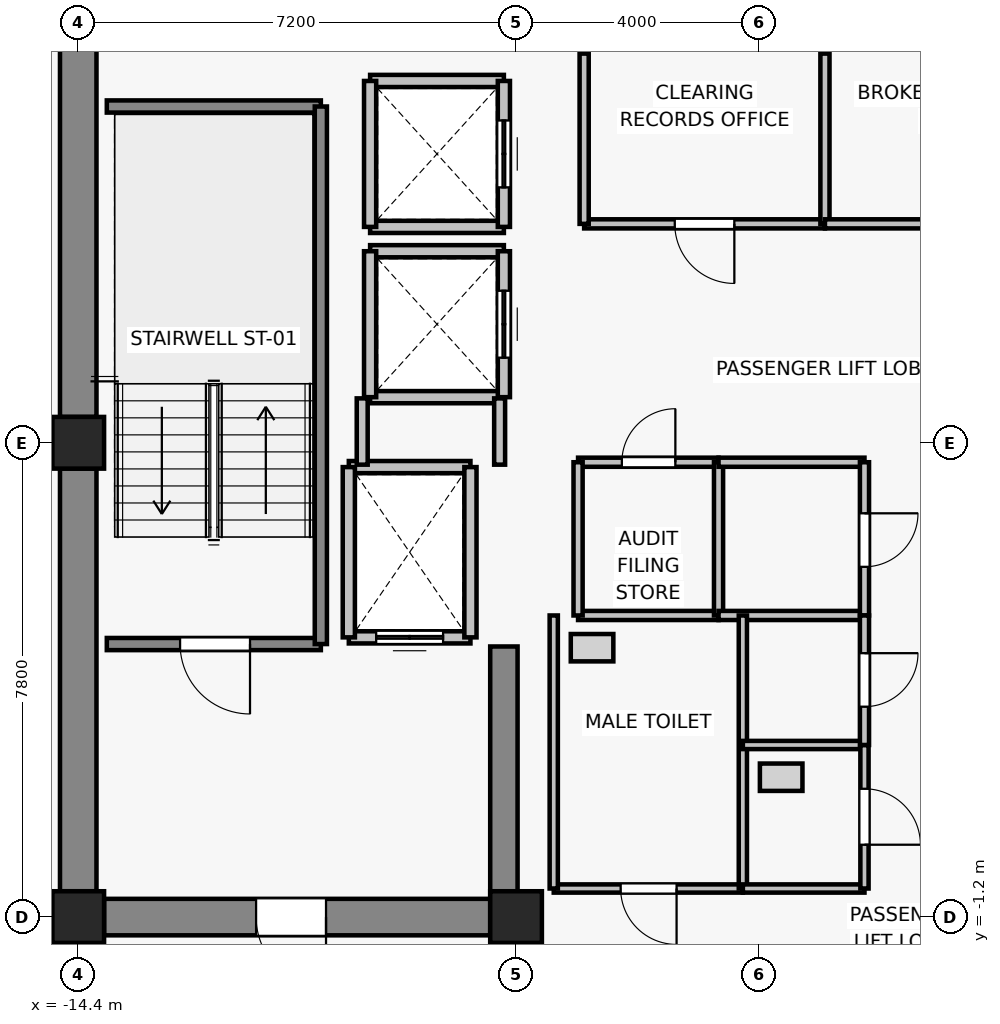
"""IFC4 building model, lengths in metres.
Left out: names, types, materials, properties, quantities, classifications, styles, units other than length and angle.
Written with IfcOpenShell. Run it as: python <this file> out.ifc"""

import sys

from ifc_helpers import new_model, si_unit, direction, frame, frame_2d, origin, origin_2d, place, context, subcontext, project, spatial, rectangle, extrude, source, transform, mapped, element, fill, save


model = new_model("IFC4")
c1 = context("Model", 3, precision=1e-05, world=origin(), true_north=direction((0.0, 1.0)))
c2 = subcontext(c1, "Body", "Model", "MODEL_VIEW")
j1 = project(units=[si_unit("LENGTHUNIT", "METRE"), si_unit("PLANEANGLEUNIT", "RADIAN")], contexts=[c1])
p1 = place(None, origin())
s1 = spatial("IfcSite", under=j1, at=p1, CompositionType="ELEMENT")
p2 = place(p1, origin())
s2 = spatial("IfcBuilding", under=s1, at=p2, CompositionType="ELEMENT")
p3 = place(p2, frame((0.0, 0.0, 225.4)))
s3 = spatial("IfcBuildingStorey", under=s2, at=p3, CompositionType="ELEMENT", Elevation=225.4)
for number, where, z_axis, x_axis in (
    (1, (-14.4, -1.2, 0.0), (0.0, 0.0, 1.0), (1.0, 0.0, 0.0)),
    (2, (-7.2, -1.2, 0.0), (0.0, 0.0, 1.0), (1.0, 0.0, 0.0)),
    (3, (-14.4, 6.6, 0.0), (0.0, 0.0, 1.0), (1.0, 0.0, 0.0)),
):
    element("IfcColumn", number, at=place(p3, frame(where, z_axis=z_axis, x_axis=x_axis)), inside=s3, PredefinedType="COLUMN", context=c2, shape_type="SweptSolid", body=[
        extrude(rectangle(XDim=0.85, YDim=0.85, at=origin_2d()), origin(), (0.0, 0.0, 1.0), 3.3),
    ])
p4 = place(p3, frame((-14.4, -0.775, 0.0), z_axis=(0.0, 0.0, 1.0), x_axis=(0.0, 1.0, 0.0)))
e4 = element("IfcWall", 4, at=p4, inside=s3, PredefinedType="SHEAR", context=c2, shape_type="SweptSolid", body=[
    extrude(rectangle(XDim=6.95, YDim=0.6, at=frame_2d((3.475, 0.0))), origin(), (0.0, 0.0, 1.0), 3.075),
])
p5 = place(p3, frame((-14.4, 7.025, 0.0), z_axis=(0.0, 0.0, 1.0), x_axis=(0.0, 1.0, 0.0)))
e5 = element("IfcWall", 5, at=p5, inside=s3, PredefinedType="SHEAR", context=c2, shape_type="SweptSolid", body=[
    extrude(rectangle(XDim=6.05, YDim=0.6, at=frame_2d((3.025, 0.0))), origin(), (0.0, 0.0, 1.0), 3.075),
])
p6 = place(p3, frame((-7.625, -1.2, 0.0), z_axis=(0.0, 0.0, 1.0), x_axis=(-1.0, 0.0, 0.0)))
e6 = element("IfcWall", 6, at=p6, inside=s3, PredefinedType="SHEAR", context=c2, shape_type="SweptSolid", body=[
    extrude(rectangle(XDim=6.35, YDim=0.6, at=frame_2d((3.175, 0.0))), origin(), (0.0, 0.0, 1.0), 3.075),
])
p7 = place(p6, frame((2.7, 0.0, 0.0)))
e7 = element("IfcOpeningElement", 7, at=p7, cuts=e6, PredefinedType="OPENING", context=c2, shape_type="SweptSolid", body=[
    extrude(rectangle(XDim=1.15, YDim=2.15, at=frame_2d((0.575, 1.075))), frame((0.0, 0.31, 0.0), z_axis=(0.0, -1.0, 0.0), x_axis=(1.0, 0.0, 0.0)), (0.0, 0.0, 1.0), 0.62),
])
p8 = place(p3, frame((-7.4, -0.9, 0.0), z_axis=(0.0, 0.0, 1.0), x_axis=(0.0, 1.0, 0.0)))
e8 = element("IfcWall", 8, at=p8, inside=s3, PredefinedType="SHEAR", context=c2, shape_type="SweptSolid", body=[
    extrude(rectangle(XDim=4.15, YDim=0.45, at=frame_2d((2.075, 0.0))), origin(), (0.0, 0.0, 1.0), 3.075),
])
p9 = place(p3, frame((-7.95, 3.4, 0.0), z_axis=(0.0, 0.0, 1.0), x_axis=(-1.0, 0.0, 0.0)))
e9 = element("IfcWall", 9, at=p9, inside=s3, PredefinedType="SOLIDWALL", context=c2, shape_type="SweptSolid", body=[
    extrude(rectangle(XDim=2.0, YDim=0.2, at=frame_2d((1.0, 0.0))), origin(), (0.0, 0.0, 1.0), 3.075),
])
p10 = place(p9, frame((0.45, 0.0, 0.0)))
e10 = element("IfcOpeningElement", 10, at=p10, cuts=e9, PredefinedType="OPENING", context=c2, shape_type="SweptSolid", body=[
    extrude(rectangle(XDim=1.1, YDim=2.2, at=frame_2d((0.55, 1.1))), frame((0.0, 0.11, 0.0), z_axis=(0.0, -1.0, 0.0), x_axis=(1.0, 0.0, 0.0)), (0.0, 0.0, 1.0), 0.22),
])
p11 = place(p3, frame((-9.95, 6.2, 0.0), z_axis=(0.0, 0.0, 1.0), x_axis=(1.0, 0.0, 0.0)))
e11 = element("IfcWall", 11, at=p11, inside=s3, PredefinedType="SOLIDWALL", context=c2, shape_type="SweptSolid", body=[
    extrude(rectangle(XDim=2.0, YDim=0.2, at=frame_2d((1.0, 0.0))), origin(), (0.0, 0.0, 1.0), 3.075),
])
for number, where, z_axis, x_axis in (
    (12, (-9.95, 3.4, 0.0), (0.0, 0.0, 1.0), (0.0, 1.0, 0.0)),
    (13, (-7.95, 6.2, 0.0), (0.0, 0.0, 1.0), (0.0, -1.0, 0.0)),
):
    element("IfcWall", number, at=place(p3, frame(where, z_axis=z_axis, x_axis=x_axis)), inside=s3, PredefinedType="SOLIDWALL", context=c2, shape_type="SweptSolid", body=[
        extrude(rectangle(XDim=2.8, YDim=0.2, at=frame_2d((1.4, 0.0))), origin(), (0.0, 0.0, 1.0), 3.075),
    ])
for number, where, z_axis, x_axis in (
    (14, (-7.4, 7.35, 0.0), (0.0, 0.0, 1.0), (-1.0, 0.0, 0.0)),
    (15, (-9.6, 9.75, 0.0), (0.0, 0.0, 1.0), (1.0, 0.0, 0.0)),
):
    element("IfcWall", number, at=place(p3, frame(where, z_axis=z_axis, x_axis=x_axis)), inside=s3, PredefinedType="SOLIDWALL", context=c2, shape_type="SweptSolid", body=[
        extrude(rectangle(XDim=2.2, YDim=0.2, at=frame_2d((1.1, 0.0))), origin(), (0.0, 0.0, 1.0), 2.615),
    ])
p12 = place(p3, frame((-9.6, 7.35, 0.0), z_axis=(0.0, 0.0, 1.0), x_axis=(0.0, 1.0, 0.0)))
e16 = element("IfcWall", 16, at=p12, inside=s3, PredefinedType="SOLIDWALL", context=c2, shape_type="SweptSolid", body=[
    extrude(rectangle(XDim=2.4, YDim=0.2, at=frame_2d((1.2, 0.0))), origin(), (0.0, 0.0, 1.0), 3.075),
])
p13 = place(p3, frame((-7.4, 9.75, 0.0), z_axis=(0.0, 0.0, 1.0), x_axis=(0.0, -1.0, 0.0)))
e17 = element("IfcWall", 17, at=p13, inside=s3, PredefinedType="SOLIDWALL", context=c2, shape_type="SweptSolid", body=[
    extrude(rectangle(XDim=2.4, YDim=0.2, at=frame_2d((1.2, 0.0))), origin(), (0.0, 0.0, 1.0), 2.615),
])
p14 = place(p13, frame((0.65, 0.0, 0.0)))
e18 = element("IfcOpeningElement", 18, at=p14, cuts=e17, PredefinedType="OPENING", context=c2, shape_type="SweptSolid", body=[
    extrude(rectangle(XDim=1.1, YDim=2.2, at=frame_2d((0.55, 1.1))), frame((0.0, 0.11, 0.0), z_axis=(0.0, -1.0, 0.0), x_axis=(1.0, 0.0, 0.0)), (0.0, 0.0, 1.0), 0.22),
])
for number, where, z_axis, x_axis in (
    (19, (-7.4, 10.15, 0.0), (0.0, 0.0, 1.0), (-1.0, 0.0, 0.0)),
    (20, (-9.6, 12.55, 0.0), (0.0, 0.0, 1.0), (1.0, 0.0, 0.0)),
):
    element("IfcWall", number, at=place(p3, frame(where, z_axis=z_axis, x_axis=x_axis)), inside=s3, PredefinedType="SOLIDWALL", context=c2, shape_type="SweptSolid", body=[
        extrude(rectangle(XDim=2.2, YDim=0.2, at=frame_2d((1.1, 0.0))), origin(), (0.0, 0.0, 1.0), 2.615),
    ])
p15 = place(p3, frame((-9.6, 10.15, 0.0), z_axis=(0.0, 0.0, 1.0), x_axis=(0.0, 1.0, 0.0)))
e21 = element("IfcWall", 21, at=p15, inside=s3, PredefinedType="SOLIDWALL", context=c2, shape_type="SweptSolid", body=[
    extrude(rectangle(XDim=2.4, YDim=0.2, at=frame_2d((1.2, 0.0))), origin(), (0.0, 0.0, 1.0), 3.075),
])
p16 = place(p3, frame((-7.4, 12.55, 0.0), z_axis=(0.0, 0.0, 1.0), x_axis=(0.0, -1.0, 0.0)))
e22 = element("IfcWall", 22, at=p16, inside=s3, PredefinedType="SOLIDWALL", context=c2, shape_type="SweptSolid", body=[
    extrude(rectangle(XDim=2.4, YDim=0.2, at=frame_2d((1.2, 0.0))), origin(), (0.0, 0.0, 1.0), 2.615),
])
p17 = place(p16, frame((0.65, 0.0, 0.0)))
e23 = element("IfcOpeningElement", 23, at=p17, cuts=e22, PredefinedType="OPENING", context=c2, shape_type="SweptSolid", body=[
    extrude(rectangle(XDim=1.1, YDim=2.2, at=frame_2d((0.55, 1.1))), frame((0.0, 0.11, 0.0), z_axis=(0.0, -1.0, 0.0), x_axis=(1.0, 0.0, 0.0)), (0.0, 0.0, 1.0), 0.22),
])
p18 = place(p3, frame((-10.41, 3.29, 0.0), z_axis=(0.0, 0.0, 1.0), x_axis=(-1.0, 0.0, 0.0)))
e24 = element("IfcWall", 24, at=p18, inside=s3, PredefinedType="SOLIDWALL", context=c2, shape_type="SweptSolid", body=[
    extrude(rectangle(XDim=3.52, YDim=0.2, at=frame_2d((1.76, 0.0))), origin(), (0.0, 0.0, 1.0), 3.075),
])
p19 = place(p18, frame((1.165, 0.0, 0.0)))
e25 = element("IfcOpeningElement", 25, at=p19, cuts=e24, PredefinedType="OPENING", context=c2, shape_type="SweptSolid", body=[
    extrude(rectangle(XDim=1.15, YDim=2.15, at=frame_2d((0.575, 1.075))), frame((0.0, 0.11, 0.0), z_axis=(0.0, -1.0, 0.0), x_axis=(1.0, 0.0, 0.0)), (0.0, 0.0, 1.0), 0.22),
])
p20 = place(p3, frame((-13.93, 12.13, 0.0), z_axis=(0.0, 0.0, 1.0), x_axis=(1.0, 0.0, 0.0)))
e26 = element("IfcWall", 26, at=p20, inside=s3, PredefinedType="SOLIDWALL", context=c2, shape_type="SweptSolid", body=[
    extrude(rectangle(XDim=3.52, YDim=0.2, at=frame_2d((1.76, 0.0))), origin(), (0.0, 0.0, 1.0), 3.075),
])
p21 = place(p3, frame((-10.41, 12.13, 0.0), z_axis=(0.0, 0.0, 1.0), x_axis=(0.0, -1.0, 0.0)))
e27 = element("IfcWall", 27, at=p21, inside=s3, PredefinedType="SOLIDWALL", context=c2, shape_type="SweptSolid", body=[
    extrude(rectangle(XDim=8.84, YDim=0.2, at=frame_2d((4.42, 0.0))), origin(), (0.0, 0.0, 1.0), 3.075),
])
p22 = place(p3, frame((-9.73, 6.24, 0.0), z_axis=(0.0, 0.0, 1.0), x_axis=(0.0, 1.0, 0.0)))
e28 = element("IfcWall", 28, at=p22, inside=s3, PredefinedType="PARTITIONING", context=c2, shape_type="SweptSolid", body=[
    extrude(rectangle(XDim=1.09, YDim=0.18, at=frame_2d((0.545, 0.0))), origin(), (0.0, 0.0, 1.0), 3.075),
])
p23 = place(p3, frame((-7.47, 7.33, 0.0), z_axis=(0.0, 0.0, 1.0), x_axis=(0.0, -1.0, 0.0)))
e29 = element("IfcWall", 29, at=p23, inside=s3, PredefinedType="PARTITIONING", context=c2, shape_type="SweptSolid", body=[
    extrude(rectangle(XDim=1.09, YDim=0.18, at=frame_2d((0.545, 0.0))), origin(), (0.0, 0.0, 1.0), 2.615),
])
p24 = place(p3, frame((-2.12, 10.2, 0.0), z_axis=(0.0, 0.0, 1.0), x_axis=(-1.0, 0.0, 0.0)))
e30 = element("IfcWall", 30, at=p24, inside=s3, PredefinedType="PARTITIONING", context=c2, shape_type="SweptSolid", body=[
    extrude(rectangle(XDim=3.96, YDim=0.15, at=frame_2d((1.98, 0.0))), origin(), (0.0, 0.0, 1.0), 3.075),
])
p25 = place(p24, frame((1.49, 0.0, 0.0)))
e31 = element("IfcOpeningElement", 31, at=p25, cuts=e30, PredefinedType="OPENING", context=c2, shape_type="SweptSolid", body=[
    extrude(rectangle(XDim=0.98, YDim=2.15, at=frame_2d((0.49, 1.075))), frame((0.0, 0.085, 0.0), z_axis=(0.0, -1.0, 0.0), x_axis=(1.0, 0.0, 0.0)), (0.0, 0.0, 1.0), 0.17),
])
for number, where, z_axis, x_axis in (
    (32, (-6.08, 10.2, 0.0), (0.0, 0.0, 1.0), (0.0, 1.0, 0.0)),
    (33, (-2.12, 13.0, 0.0), (0.0, 0.0, 1.0), (0.0, -1.0, 0.0)),
):
    element("IfcWall", number, at=place(p3, frame(where, z_axis=z_axis, x_axis=x_axis)), inside=s3, PredefinedType="PARTITIONING", context=c2, shape_type="SweptSolid", body=[
        extrude(rectangle(XDim=2.8, YDim=0.15, at=frame_2d((1.4, 0.0))), origin(), (0.0, 0.0, 1.0), 3.075),
    ])
p26 = place(p3, frame((2.04, 10.2, 0.0), z_axis=(0.0, 0.0, 1.0), x_axis=(-1.0, 0.0, 0.0)))
e34 = element("IfcWall", 34, at=p26, inside=s3, PredefinedType="PARTITIONING", context=c2, shape_type="SweptSolid", body=[
    extrude(rectangle(XDim=4.16, YDim=0.15, at=frame_2d((2.08, 0.0))), origin(), (0.0, 0.0, 1.0), 3.075),
])
p27 = place(p26, frame((1.55, 0.0, 0.0)))
e35 = element("IfcOpeningElement", 35, at=p27, cuts=e34, PredefinedType="OPENING", context=c2, shape_type="SweptSolid", body=[
    extrude(rectangle(XDim=0.98, YDim=2.15, at=frame_2d((0.49, 1.075))), frame((0.0, 0.085, 0.0), z_axis=(0.0, -1.0, 0.0), x_axis=(1.0, 0.0, 0.0)), (0.0, 0.0, 1.0), 0.17),
])
p28 = place(p3, frame((-3.87, 3.76, 0.0), z_axis=(0.0, 0.0, 1.0), x_axis=(-1.0, 0.0, 0.0)))
e36 = element("IfcWall", 36, at=p28, inside=s3, PredefinedType="PARTITIONING", context=c2, shape_type="SweptSolid", body=[
    extrude(rectangle(XDim=2.31, YDim=0.15, at=frame_2d((1.155, 0.0))), origin(), (0.0, 0.0, 1.0), 3.075),
])
p29 = place(p3, frame((-6.18, 6.28, 0.0), z_axis=(0.0, 0.0, 1.0), x_axis=(1.0, 0.0, 0.0)))
e37 = element("IfcWall", 37, at=p29, inside=s3, PredefinedType="PARTITIONING", context=c2, shape_type="SweptSolid", body=[
    extrude(rectangle(XDim=2.31, YDim=0.15, at=frame_2d((1.155, 0.0))), origin(), (0.0, 0.0, 1.0), 3.075),
])
p30 = place(p29, frame((0.72, 0.0, 0.0)))
e38 = element("IfcOpeningElement", 38, at=p30, cuts=e37, PredefinedType="OPENING", context=c2, shape_type="SweptSolid", body=[
    extrude(rectangle(XDim=0.88, YDim=2.1, at=frame_2d((0.44, 1.05))), frame((0.0, 0.085, 0.0), z_axis=(0.0, -1.0, 0.0), x_axis=(1.0, 0.0, 0.0)), (0.0, 0.0, 1.0), 0.17),
])
for number, where, z_axis, x_axis in (
    (39, (-6.18, 3.76, 0.0), (0.0, 0.0, 1.0), (0.0, 1.0, 0.0)),
    (40, (-3.87, 6.28, 0.0), (0.0, 0.0, 1.0), (0.0, -1.0, 0.0)),
):
    element("IfcWall", number, at=place(p3, frame(where, z_axis=z_axis, x_axis=x_axis)), inside=s3, PredefinedType="PARTITIONING", context=c2, shape_type="SweptSolid", body=[
        extrude(rectangle(XDim=2.52, YDim=0.15, at=frame_2d((1.26, 0.0))), origin(), (0.0, 0.0, 1.0), 3.075),
    ])
for number, where, z_axis, x_axis in (
    (41, (-1.47, 3.76, 0.0), (0.0, 0.0, 1.0), (-1.0, 0.0, 0.0)),
    (42, (-3.87, 6.28, 0.0), (0.0, 0.0, 1.0), (1.0, 0.0, 0.0)),
):
    element("IfcWall", number, at=place(p3, frame(where, z_axis=z_axis, x_axis=x_axis)), inside=s3, PredefinedType="PARTITIONING", context=c2, shape_type="SweptSolid", body=[
        extrude(rectangle(XDim=2.4, YDim=0.15, at=frame_2d((1.2, 0.0))), origin(), (0.0, 0.0, 1.0), 3.075),
    ])
p31 = place(p3, frame((-1.47, 6.28, 0.0), z_axis=(0.0, 0.0, 1.0), x_axis=(0.0, -1.0, 0.0)))
e43 = element("IfcWall", 43, at=p31, inside=s3, PredefinedType="PARTITIONING", context=c2, shape_type="SweptSolid", body=[
    extrude(rectangle(XDim=2.52, YDim=0.15, at=frame_2d((1.26, 0.0))), origin(), (0.0, 0.0, 1.0), 3.075),
])
p32 = place(p31, frame((0.84, 0.0, 0.0)))
e44 = element("IfcOpeningElement", 44, at=p32, cuts=e43, PredefinedType="OPENING", context=c2, shape_type="SweptSolid", body=[
    extrude(rectangle(XDim=0.88, YDim=2.1, at=frame_2d((0.44, 1.05))), frame((0.0, 0.085, 0.0), z_axis=(0.0, -1.0, 0.0), x_axis=(1.0, 0.0, 0.0)), (0.0, 0.0, 1.0), 0.17),
])
p33 = place(p3, frame((-3.47, -0.73, 0.0), z_axis=(0.0, 0.0, 1.0), x_axis=(-1.0, 0.0, 0.0)))
e45 = element("IfcWall", 45, at=p33, inside=s3, PredefinedType="PARTITIONING", context=c2, shape_type="SweptSolid", body=[
    extrude(rectangle(XDim=3.11, YDim=0.135, at=frame_2d((1.555, 0.0))), origin(), (0.0, 0.0, 1.0), 3.075),
])
p34 = place(p33, frame((1.09, 0.0, 0.0)))
e46 = element("IfcOpeningElement", 46, at=p34, cuts=e45, PredefinedType="OPENING", context=c2, shape_type="SweptSolid", body=[
    extrude(rectangle(XDim=0.92, YDim=2.1, at=frame_2d((0.46, 1.05))), frame((0.0, 0.077, 0.0), z_axis=(0.0, -1.0, 0.0), x_axis=(1.0, 0.0, 0.0)), (0.0, 0.0, 1.0), 0.155),
])
for number, where, z_axis, x_axis in (
    (47, (-6.58, -0.73, 0.0), (0.0, 0.0, 1.0), (0.0, 1.0, 0.0)),
    (48, (-3.47, 3.76, 0.0), (0.0, 0.0, 1.0), (0.0, -1.0, 0.0)),
):
    element("IfcWall", number, at=place(p3, frame(where, z_axis=z_axis, x_axis=x_axis)), inside=s3, PredefinedType="PARTITIONING", context=c2, shape_type="SweptSolid", body=[
        extrude(rectangle(XDim=4.49, YDim=0.135, at=frame_2d((2.245, 0.0))), origin(), (0.0, 0.0, 1.0), 3.075),
    ])
for number, where, z_axis, x_axis in (
    (49, (-1.47, -0.73, 0.0), (0.0, 0.0, 1.0), (-1.0, 0.0, 0.0)),
    (50, (-3.47, 1.63, 0.0), (0.0, 0.0, 1.0), (1.0, 0.0, 0.0)),
):
    element("IfcWall", number, at=place(p3, frame(where, z_axis=z_axis, x_axis=x_axis)), inside=s3, PredefinedType="PARTITIONING", context=c2, shape_type="SweptSolid", body=[
        extrude(rectangle(XDim=2.0, YDim=0.135, at=frame_2d((1.0, 0.0))), origin(), (0.0, 0.0, 1.0), 3.075),
    ])
p35 = place(p3, frame((-1.47, 1.63, 0.0), z_axis=(0.0, 0.0, 1.0), x_axis=(0.0, -1.0, 0.0)))
e51 = element("IfcWall", 51, at=p35, inside=s3, PredefinedType="PARTITIONING", context=c2, shape_type="SweptSolid", body=[
    extrude(rectangle(XDim=2.36, YDim=0.135, at=frame_2d((1.18, 0.0))), origin(), (0.0, 0.0, 1.0), 3.075),
])
p36 = place(p35, frame((0.72, 0.0, 0.0)))
e52 = element("IfcOpeningElement", 52, at=p36, cuts=e51, PredefinedType="OPENING", context=c2, shape_type="SweptSolid", body=[
    extrude(rectangle(XDim=0.92, YDim=2.1, at=frame_2d((0.46, 1.05))), frame((0.0, 0.077, 0.0), z_axis=(0.0, -1.0, 0.0), x_axis=(1.0, 0.0, 0.0)), (0.0, 0.0, 1.0), 0.155),
])
p37 = place(p3, frame((-1.47, 3.76, 0.0), z_axis=(0.0, 0.0, 1.0), x_axis=(0.0, -1.0, 0.0)))
e53 = element("IfcWall", 53, at=p37, inside=s3, PredefinedType="PARTITIONING", context=c2, shape_type="SweptSolid", body=[
    extrude(rectangle(XDim=2.13, YDim=0.15, at=frame_2d((1.065, 0.0))), origin(), (0.0, 0.0, 1.0), 3.075),
])
p38 = place(p37, frame((0.62, 0.0, 0.0)))
e54 = element("IfcOpeningElement", 54, at=p38, cuts=e53, PredefinedType="OPENING", context=c2, shape_type="SweptSolid", body=[
    extrude(rectangle(XDim=0.88, YDim=2.1, at=frame_2d((0.44, 1.05))), frame((0.0, 0.085, 0.0), z_axis=(0.0, -1.0, 0.0), x_axis=(1.0, 0.0, 0.0)), (0.0, 0.0, 1.0), 0.17),
])
m1 = source(origin(), c2, "Body", "SweptSolid", [
    extrude(rectangle(XDim=1.1, YDim=2.2, at=frame_2d((0.55, 1.1))), frame((0.0, 0.025, 0.0), z_axis=(0.0, -1.0, 0.0), x_axis=(1.0, 0.0, 0.0)), (0.0, 0.0, 1.0), 0.05),
])
p39 = place(p10, origin())
e55 = element("IfcDoor", 55, at=p39, inside=s3, OperationType="DOUBLE_DOOR_SLIDING", PredefinedType="DOOR", context=c2, shape_type="MappedRepresentation", body=[
    mapped(m1, transform((0.0, 0.0, 0.0), x_axis=(1.0, 0.0, 0.0), y_axis=(0.0, 1.0, 0.0), z_axis=(0.0, 0.0, 1.0), scale=1.0)),
])
fill(e10, e55)
p40 = place(p14, origin())
e56 = element("IfcDoor", 56, at=p40, inside=s3, OperationType="DOUBLE_DOOR_SLIDING", PredefinedType="DOOR", context=c2, shape_type="MappedRepresentation", body=[
    mapped(m1, transform((0.0, 0.0, 0.0), x_axis=(1.0, 0.0, 0.0), y_axis=(0.0, 1.0, 0.0), z_axis=(0.0, 0.0, 1.0), scale=1.0)),
])
fill(e18, e56)
p41 = place(p17, origin())
e57 = element("IfcDoor", 57, at=p41, inside=s3, OperationType="DOUBLE_DOOR_SLIDING", PredefinedType="DOOR", context=c2, shape_type="MappedRepresentation", body=[
    mapped(m1, transform((0.0, 0.0, 0.0), x_axis=(1.0, 0.0, 0.0), y_axis=(0.0, 1.0, 0.0), z_axis=(0.0, 0.0, 1.0), scale=1.0)),
])
fill(e23, e57)
m2 = source(origin(), c2, "Body", "SweptSolid", [
    extrude(rectangle(XDim=1.15, YDim=2.15, at=frame_2d((0.575, 1.075))), frame((0.0, 0.025, 0.0), z_axis=(0.0, -1.0, 0.0), x_axis=(1.0, 0.0, 0.0)), (0.0, 0.0, 1.0), 0.05),
])
p42 = place(p19, origin())
e58 = element("IfcDoor", 58, at=p42, inside=s3, OperationType="SINGLE_SWING_LEFT", PredefinedType="DOOR", context=c2, shape_type="MappedRepresentation", body=[
    mapped(m2, transform((0.0, 0.0, 0.0), x_axis=(1.0, 0.0, 0.0), y_axis=(0.0, 1.0, 0.0), z_axis=(0.0, 0.0, 1.0), scale=1.0)),
])
fill(e25, e58)
p43 = place(p7, origin())
e59 = element("IfcDoor", 59, at=p43, inside=s3, OperationType="SINGLE_SWING_LEFT", PredefinedType="DOOR", context=c2, shape_type="MappedRepresentation", body=[
    mapped(m2, transform((0.0, 0.0, 0.0), x_axis=(1.0, 0.0, 0.0), y_axis=(0.0, 1.0, 0.0), z_axis=(0.0, 0.0, 1.0), scale=1.0)),
])
fill(e7, e59)
m3 = source(origin(), c2, "Body", "SweptSolid", [
    extrude(rectangle(XDim=0.98, YDim=2.15, at=frame_2d((0.49, 1.075))), frame((0.0, 0.025, 0.0), z_axis=(0.0, -1.0, 0.0), x_axis=(1.0, 0.0, 0.0)), (0.0, 0.0, 1.0), 0.05),
])
p44 = place(p25, origin())
e60 = element("IfcDoor", 60, at=p44, inside=s3, OperationType="SINGLE_SWING_LEFT", PredefinedType="DOOR", context=c2, shape_type="MappedRepresentation", body=[
    mapped(m3, transform((0.0, 0.0, 0.0), x_axis=(1.0, 0.0, 0.0), y_axis=(0.0, 1.0, 0.0), z_axis=(0.0, 0.0, 1.0), scale=1.0)),
])
fill(e31, e60)
m4 = source(origin(), c2, "Body", "SweptSolid", [
    extrude(rectangle(XDim=0.88, YDim=2.1, at=frame_2d((0.44, 1.05))), frame((0.0, 0.025, 0.0), z_axis=(0.0, -1.0, 0.0), x_axis=(1.0, 0.0, 0.0)), (0.0, 0.0, 1.0), 0.05),
])
p45 = place(p30, origin())
e61 = element("IfcDoor", 61, at=p45, inside=s3, OperationType="SINGLE_SWING_RIGHT", PredefinedType="DOOR", context=c2, shape_type="MappedRepresentation", body=[
    mapped(m4, transform((0.0, 0.0, 0.0), x_axis=(1.0, 0.0, 0.0), y_axis=(0.0, 1.0, 0.0), z_axis=(0.0, 0.0, 1.0), scale=1.0)),
])
fill(e38, e61)
p46 = place(p32, origin())
e62 = element("IfcDoor", 62, at=p46, inside=s3, OperationType="SINGLE_SWING_LEFT", PredefinedType="DOOR", context=c2, shape_type="MappedRepresentation", body=[
    mapped(m4, transform((0.0, 0.0, 0.0), x_axis=(1.0, 0.0, 0.0), y_axis=(0.0, 1.0, 0.0), z_axis=(0.0, 0.0, 1.0), scale=1.0)),
])
fill(e44, e62)
m5 = source(origin(), c2, "Body", "SweptSolid", [
    extrude(rectangle(XDim=0.92, YDim=2.1, at=frame_2d((0.46, 1.05))), frame((0.0, 0.025, 0.0), z_axis=(0.0, -1.0, 0.0), x_axis=(1.0, 0.0, 0.0)), (0.0, 0.0, 1.0), 0.05),
])
p47 = place(p34, origin())
e63 = element("IfcDoor", 63, at=p47, inside=s3, OperationType="SINGLE_SWING_LEFT", PredefinedType="DOOR", context=c2, shape_type="MappedRepresentation", body=[
    mapped(m5, transform((0.0, 0.0, 0.0), x_axis=(1.0, 0.0, 0.0), y_axis=(0.0, 1.0, 0.0), z_axis=(0.0, 0.0, 1.0), scale=1.0)),
])
fill(e46, e63)
p48 = place(p36, origin())
e64 = element("IfcDoor", 64, at=p48, inside=s3, OperationType="SINGLE_SWING_RIGHT", PredefinedType="DOOR", context=c2, shape_type="MappedRepresentation", body=[
    mapped(m5, transform((0.0, 0.0, 0.0), x_axis=(1.0, 0.0, 0.0), y_axis=(0.0, 1.0, 0.0), z_axis=(0.0, 0.0, 1.0), scale=1.0)),
])
fill(e52, e64)
p49 = place(p38, origin())
e65 = element("IfcDoor", 65, at=p49, inside=s3, OperationType="SINGLE_SWING_LEFT", PredefinedType="DOOR", context=c2, shape_type="MappedRepresentation", body=[
    mapped(m4, transform((0.0, 0.0, 0.0), x_axis=(1.0, 0.0, 0.0), y_axis=(0.0, 1.0, 0.0), z_axis=(0.0, 0.0, 1.0), scale=1.0)),
])
fill(e54, e65)
save(model, sys.argv[1])
